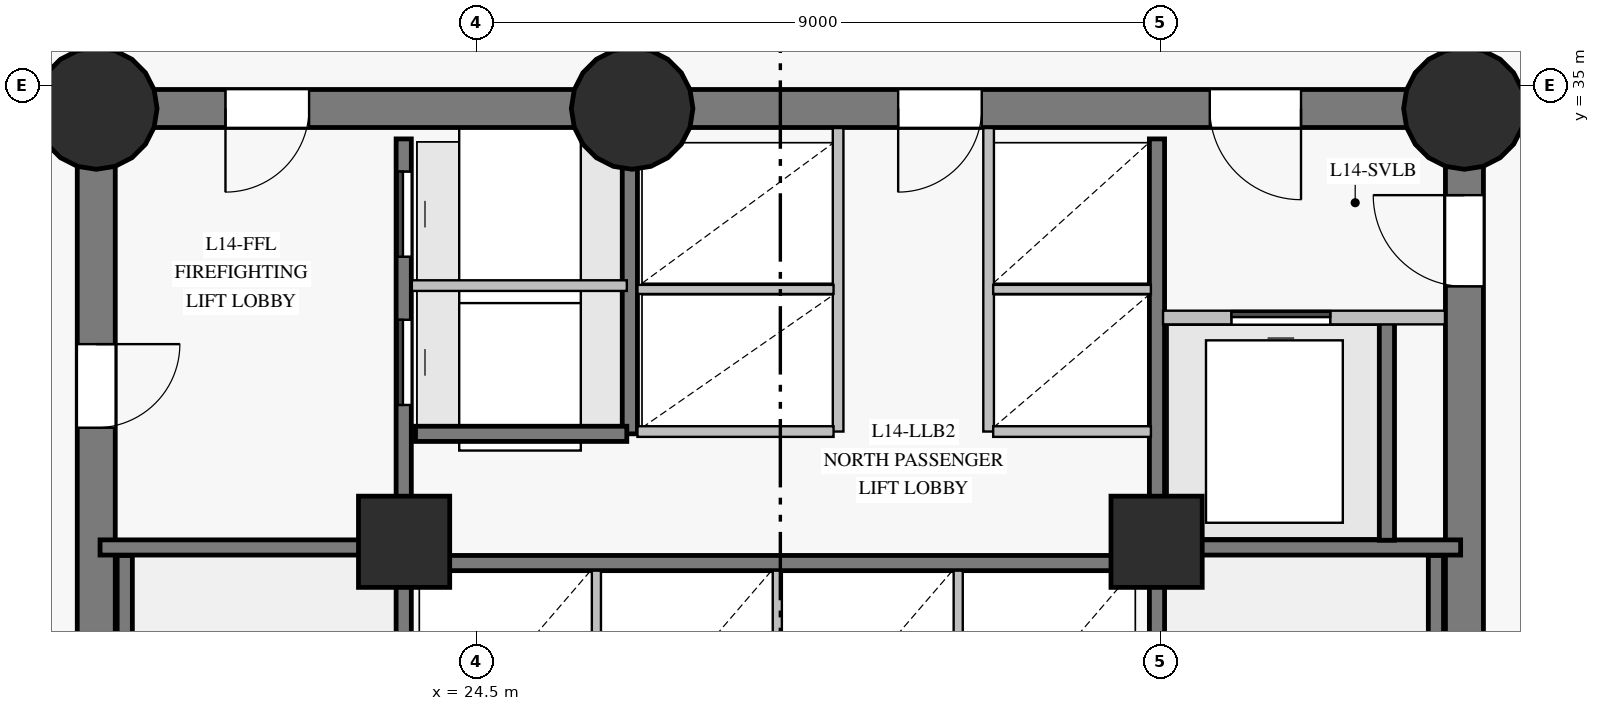
"""IFC4 building model, lengths in metres.
Left out: names, types, materials, properties, quantities, classifications, styles, units other than length and angle.
Written with IfcOpenShell. Run it as: python <this file> out.ifc"""

import sys

from ifc_helpers import new_model, si_unit, direction, frame, frame_2d, origin, origin_with_axes, origin_2d, place, context, subcontext, project, spatial, rectangle, circle, extrude, source, transform, mapped, element, fill, save


model = new_model("IFC4")
c1 = context("Model", 3, precision=1e-05, world=origin(), true_north=direction((0.0, 1.0)))
c2 = subcontext(c1, "Body", "Model", "MODEL_VIEW")
j1 = project(units=[si_unit("LENGTHUNIT", "METRE"), si_unit("PLANEANGLEUNIT", "RADIAN")], contexts=[c1])
p1 = place(None, origin())
s1 = spatial("IfcSite", under=j1, at=p1, CompositionType="ELEMENT")
p2 = place(p1, origin())
s2 = spatial("IfcBuilding", under=s1, at=p2, CompositionType="ELEMENT")
p3 = place(p2, frame((0.0, 0.0, 55.3)))
s3 = spatial("IfcBuildingStorey", under=s2, at=p3, CompositionType="ELEMENT", Elevation=55.3)
p4 = place(p3, frame((37.5, 18.3, 0.0), z_axis=(0.0, 0.0, 1.0), x_axis=(0.0, 1.0, 0.0)))
e1 = element("IfcWall", 1, at=p4, inside=s3, PredefinedType="SHEAR", context=c2, shape_type="SweptSolid", body=[
    extrude(rectangle(XDim=16.4, YDim=0.5, at=frame_2d((8.2, 0.0))), origin(), (0.0, 0.0, 1.0), 3.35),
])
p5 = place(p4, frame((14.06, 0.0, 0.0)))
e2 = element("IfcOpeningElement", 2, at=p5, cuts=e1, PredefinedType="OPENING", context=c2, shape_type="SweptSolid", body=[
    extrude(rectangle(XDim=1.2, YDim=2.15, at=frame_2d((0.6, 1.075))), frame((0.0, 0.26, 0.0), z_axis=(0.0, -1.0, 0.0), x_axis=(1.0, 0.0, 0.0)), (0.0, 0.0, 1.0), 0.52),
])
p6 = place(p3, frame((37.5, 34.7, 0.0), z_axis=(0.0, 0.0, 1.0), x_axis=(-1.0, 0.0, 0.0)))
e3 = element("IfcWall", 3, at=p6, inside=s3, PredefinedType="SHEAR", context=c2, shape_type="SweptSolid", body=[
    extrude(rectangle(XDim=10.95, YDim=0.5, at=frame_2d((5.475, 0.0))), origin(), (0.0, 0.0, 1.0), 3.35),
])
p7 = place(p6, frame((2.15, 0.0, 0.0)))
e4 = element("IfcOpeningElement", 4, at=p7, cuts=e3, PredefinedType="OPENING", context=c2, shape_type="SweptSolid", body=[
    extrude(rectangle(XDim=1.2, YDim=2.15, at=frame_2d((0.6, 1.075))), frame((0.0, 0.26, 0.0), z_axis=(0.0, -1.0, 0.0), x_axis=(1.0, 0.0, 0.0)), (0.0, 0.0, 1.0), 0.52),
])
p8 = place(p6, frame((6.35, 0.0, 0.0)))
e5 = element("IfcOpeningElement", 5, at=p8, cuts=e3, PredefinedType="OPENING", context=c2, shape_type="SweptSolid", body=[
    extrude(rectangle(XDim=1.1, YDim=2.15, at=frame_2d((0.55, 1.075))), frame((0.0, 0.26, 0.0), z_axis=(0.0, -1.0, 0.0), x_axis=(1.0, 0.0, 0.0)), (0.0, 0.0, 1.0), 0.52),
])
p9 = place(p3, frame((26.55, 34.7, 0.0), z_axis=(0.0, 0.0, 1.0), x_axis=(-1.0, 0.0, 0.0)))
e6 = element("IfcWall", 6, at=p9, inside=s3, PredefinedType="SHEAR", context=c2, shape_type="SweptSolid", body=[
    extrude(rectangle(XDim=7.05, YDim=0.5, at=frame_2d((3.525, 0.0))), origin(), (0.0, 0.0, 1.0), 3.35),
])
p10 = place(p9, frame((4.25, 0.0, 0.0)))
e7 = element("IfcOpeningElement", 7, at=p10, cuts=e6, PredefinedType="OPENING", context=c2, shape_type="SweptSolid", body=[
    extrude(rectangle(XDim=1.1, YDim=2.15, at=frame_2d((0.55, 1.075))), frame((0.0, 0.26, 0.0), z_axis=(0.0, -1.0, 0.0), x_axis=(1.0, 0.0, 0.0)), (0.0, 0.0, 1.0), 0.52),
])
p11 = place(p3, frame((19.5, 34.7, 0.0), z_axis=(0.0, 0.0, 1.0), x_axis=(0.0, -1.0, 0.0)))
e8 = element("IfcWall", 8, at=p11, inside=s3, PredefinedType="SHEAR", context=c2, shape_type="SweptSolid", body=[
    extrude(rectangle(XDim=16.4, YDim=0.5, at=frame_2d((8.2, 0.0))), origin(), (0.0, 0.0, 1.0), 3.35),
])
p12 = place(p11, frame((3.1, 0.0, 0.0)))
e9 = element("IfcOpeningElement", 9, at=p12, cuts=e8, PredefinedType="OPENING", context=c2, shape_type="SweptSolid", body=[
    extrude(rectangle(XDim=1.1, YDim=2.15, at=frame_2d((0.55, 1.075))), frame((0.0, 0.26, 0.0), z_axis=(0.0, -1.0, 0.0), x_axis=(1.0, 0.0, 0.0)), (0.0, 0.0, 1.0), 0.52),
])
m1 = source(origin_with_axes(), c2, "Body", "SweptSolid", [
    extrude(circle(Radius=0.8, at=origin_2d()), origin(), (0.0, 0.0, 1.0), 3.6),
])
for number, where, z_axis, x_axis in (
    (10, (19.5, 34.7, 0.0), (0.0, 0.0, 1.0), (1.0, 0.0, 0.0)),
    (11, (26.55, 34.7, 0.0), (0.0, 0.0, 1.0), (1.0, 0.0, 0.0)),
    (12, (37.5, 34.7, 0.0), (0.0, 0.0, 1.0), (1.0, 0.0, 0.0)),
):
    element("IfcColumn", number, at=place(p3, frame(where, z_axis=z_axis, x_axis=x_axis)), inside=s3, PredefinedType="COLUMN", context=c2, shape_type="MappedRepresentation", body=[
        mapped(m1, transform((0.0, 0.0, 0.0), scale=1.0)),
    ])
m2 = source(origin_with_axes(), c2, "Body", "SweptSolid", [
    extrude(rectangle(XDim=1.2, YDim=1.2, at=origin_2d()), origin(), (0.0, 0.0, 1.0), 3.6),
])
for number, where, z_axis, x_axis in (
    (13, (23.55, 29.0, 0.0), (0.0, 0.0, 1.0), (1.0, 0.0, 0.0)),
    (14, (33.45, 29.0, 0.0), (0.0, 0.0, 1.0), (1.0, 0.0, 0.0)),
):
    element("IfcColumn", number, at=place(p3, frame(where, z_axis=z_axis, x_axis=x_axis)), inside=s3, PredefinedType="COLUMN", context=c2, shape_type="MappedRepresentation", body=[
        mapped(m2, transform((0.0, 0.0, 0.0), scale=1.0)),
    ])
p13 = place(p3, frame((23.545, 18.7, 0.0), z_axis=(0.0, 0.0, 1.0), x_axis=(0.0, 1.0, 0.0)))
e15 = element("IfcWall", 15, at=p13, inside=s3, PredefinedType="SHEAR", context=c2, shape_type="SweptSolid", body=[
    extrude(rectangle(XDim=15.6, YDim=0.2, at=frame_2d((7.8, 0.0))), origin(), (0.0, 0.0, 1.0), 3.35),
])
p14 = place(p13, frame((2.75, 0.0, 0.0)))
e16 = element("IfcOpeningElement", 16, at=p14, cuts=e15, PredefinedType="OPENING", context=c2, shape_type="SweptSolid", body=[
    extrude(rectangle(XDim=1.15, YDim=2.15, at=frame_2d((0.575, 1.075))), frame((0.0, 0.11, 0.0), z_axis=(0.0, -1.0, 0.0), x_axis=(1.0, 0.0, 0.0)), (0.0, 0.0, 1.0), 0.22),
])
p15 = place(p13, frame((0.14, 0.0, 0.0)))
e17 = element("IfcOpeningElement", 17, at=p15, cuts=e15, PredefinedType="OPENING", context=c2, shape_type="SweptSolid", body=[
    extrude(rectangle(XDim=0.88, YDim=2.1, at=frame_2d((0.44, 1.05))), frame((0.0, 0.11, 0.0), z_axis=(0.0, -1.0, 0.0), x_axis=(1.0, 0.0, 0.0)), (0.0, 0.0, 1.0), 0.22),
])
p16 = place(p13, frame((1.36, 0.0, 0.0)))
e18 = element("IfcOpeningElement", 18, at=p16, cuts=e15, PredefinedType="OPENING", context=c2, shape_type="SweptSolid", body=[
    extrude(rectangle(XDim=0.88, YDim=2.1, at=frame_2d((0.44, 1.05))), frame((0.0, 0.11, 0.0), z_axis=(0.0, -1.0, 0.0), x_axis=(1.0, 0.0, 0.0)), (0.0, 0.0, 1.0), 0.22),
])
p17 = place(p13, frame((12.1, 0.0, 0.0)))
e19 = element("IfcOpeningElement", 19, at=p17, cuts=e15, PredefinedType="OPENING", context=c2, shape_type="SweptSolid", body=[
    extrude(rectangle(XDim=1.12, YDim=2.15, at=frame_2d((0.56, 1.075))), frame((0.0, 0.11, 0.0), z_axis=(0.0, -1.0, 0.0), x_axis=(1.0, 0.0, 0.0)), (0.0, 0.0, 1.0), 0.22),
])
p18 = place(p13, frame((14.05, 0.0, 0.0)))
e20 = element("IfcOpeningElement", 20, at=p18, cuts=e15, PredefinedType="OPENING", context=c2, shape_type="SweptSolid", body=[
    extrude(rectangle(XDim=1.12, YDim=2.15, at=frame_2d((0.56, 1.075))), frame((0.0, 0.11, 0.0), z_axis=(0.0, -1.0, 0.0), x_axis=(1.0, 0.0, 0.0)), (0.0, 0.0, 1.0), 0.22),
])
p19 = place(p3, frame((33.455, 18.7, 0.0), z_axis=(0.0, 0.0, 1.0), x_axis=(0.0, 1.0, 0.0)))
e21 = element("IfcWall", 21, at=p19, inside=s3, PredefinedType="SHEAR", context=c2, shape_type="SweptSolid", body=[
    extrude(rectangle(XDim=15.6, YDim=0.2, at=frame_2d((7.8, 0.0))), origin(), (0.0, 0.0, 1.0), 3.35),
])
p20 = place(p19, frame((2.75, 0.0, 0.0)))
e22 = element("IfcOpeningElement", 22, at=p20, cuts=e21, PredefinedType="OPENING", context=c2, shape_type="SweptSolid", body=[
    extrude(rectangle(XDim=1.15, YDim=2.15, at=frame_2d((0.575, 1.075))), frame((0.0, 0.11, 0.0), z_axis=(0.0, -1.0, 0.0), x_axis=(1.0, 0.0, 0.0)), (0.0, 0.0, 1.0), 0.22),
])
p21 = place(p19, frame((0.55, 0.0, 0.0)))
e23 = element("IfcOpeningElement", 23, at=p21, cuts=e21, PredefinedType="OPENING", context=c2, shape_type="SweptSolid", body=[
    extrude(rectangle(XDim=0.94, YDim=2.1, at=frame_2d((0.47, 1.05))), frame((0.0, 0.11, 0.0), z_axis=(0.0, -1.0, 0.0), x_axis=(1.0, 0.0, 0.0)), (0.0, 0.0, 1.0), 0.22),
])
p22 = place(p3, frame((23.7, 28.72, 0.0), z_axis=(0.0, 0.0, 1.0), x_axis=(1.0, 0.0, 0.0)))
e24 = element("IfcWall", 24, at=p22, inside=s3, PredefinedType="SHEAR", context=c2, shape_type="SweptSolid", body=[
    extrude(rectangle(XDim=9.6, YDim=0.2, at=frame_2d((4.8, 0.0))), origin(), (0.0, 0.0, 1.0), 3.35),
])
for number, where, z_axis, x_axis in (
    (25, (19.875, 21.32, 0.0), (0.0, 0.0, 1.0), (0.0, 1.0, 0.0)),
    (26, (37.125, 21.32, 0.0), (0.0, 0.0, 1.0), (0.0, 1.0, 0.0)),
):
    element("IfcWall", number, at=place(p3, frame(where, z_axis=z_axis, x_axis=x_axis)), inside=s3, PredefinedType="SHEAR", context=c2, shape_type="SweptSolid", body=[
        extrude(rectangle(XDim=7.5, YDim=0.2, at=frame_2d((3.75, 0.0))), origin(), (0.0, 0.0, 1.0), 3.35),
    ])
for number, where, z_axis, x_axis in (
    (27, (33.455, 28.925, 0.0), (0.0, 0.0, 1.0), (1.0, 0.0, 0.0)),
    (28, (19.55, 28.925, 0.0), (0.0, 0.0, 1.0), (1.0, 0.0, 0.0)),
):
    element("IfcWall", number, at=place(p3, frame(where, z_axis=z_axis, x_axis=x_axis)), inside=s3, PredefinedType="SHEAR", context=c2, shape_type="SweptSolid", body=[
        extrude(rectangle(XDim=3.995, YDim=0.2, at=frame_2d((1.998, 0.0))), origin(), (0.0, 0.0, 1.0), 3.35),
    ])
p23 = place(p3, frame((26.52, 30.42, 0.0), z_axis=(0.0, 0.0, 1.0), x_axis=(0.0, 1.0, 0.0)))
e29 = element("IfcWall", 29, at=p23, inside=s3, PredefinedType="SHEAR", context=c2, shape_type="SweptSolid", body=[
    extrude(rectangle(XDim=3.86, YDim=0.2, at=frame_2d((1.93, 0.0))), origin(), (0.0, 0.0, 1.0), 3.35),
])
p24 = place(p3, frame((36.48, 29.02, 0.0), z_axis=(0.0, 0.0, 1.0), x_axis=(0.0, 1.0, 0.0)))
e30 = element("IfcWall", 30, at=p24, inside=s3, PredefinedType="SHEAR", context=c2, shape_type="SweptSolid", body=[
    extrude(rectangle(XDim=2.86, YDim=0.2, at=frame_2d((1.43, 0.0))), origin(), (0.0, 0.0, 1.0), 3.35),
])
p25 = place(p3, frame((23.7, 30.42, 0.0), z_axis=(0.0, 0.0, 1.0), x_axis=(1.0, 0.0, 0.0)))
e31 = element("IfcWall", 31, at=p25, inside=s3, PredefinedType="SHEAR", context=c2, shape_type="SweptSolid", body=[
    extrude(rectangle(XDim=2.78, YDim=0.2, at=frame_2d((1.39, 0.0))), origin(), (0.0, 0.0, 1.0), 3.35),
])
for number, where, z_axis, x_axis in (
    (32, (29.26, 30.45, 0.0), (0.0, 0.0, 1.0), (0.0, 1.0, 0.0)),
    (33, (31.24, 30.45, 0.0), (0.0, 0.0, 1.0), (0.0, 1.0, 0.0)),
):
    element("IfcWall", number, at=place(p3, frame(where, z_axis=z_axis, x_axis=x_axis)), inside=s3, PredefinedType="PARTITIONING", context=c2, shape_type="SweptSolid", body=[
        extrude(rectangle(XDim=3.993, YDim=0.14, at=frame_2d((1.997, 0.0))), origin(), (0.0, 0.0, 1.0), 3.35),
    ])
p26 = place(p3, frame((33.535, 31.95, 0.0), z_axis=(0.0, 0.0, 1.0), x_axis=(1.0, 0.0, 0.0)))
e34 = element("IfcWall", 34, at=p26, inside=s3, PredefinedType="PARTITIONING", context=c2, shape_type="SweptSolid", body=[
    extrude(rectangle(XDim=3.709, YDim=0.18, at=frame_2d((1.854, 0.0))), origin(), (0.0, 0.0, 1.0), 3.35),
])
p27 = place(p26, frame((0.9, 0.0, 0.0)))
e35 = element("IfcOpeningElement", 35, at=p27, cuts=e34, PredefinedType="OPENING", context=c2, shape_type="SweptSolid", body=[
    extrude(rectangle(XDim=1.3, YDim=2.2, at=frame_2d((0.65, 1.1))), frame((0.0, 0.1, 0.0), z_axis=(0.0, -1.0, 0.0), x_axis=(1.0, 0.0, 0.0)), (0.0, 0.0, 1.0), 0.2),
])
p28 = place(p3, frame((23.652, 32.37, 0.0), z_axis=(0.0, 0.0, 1.0), x_axis=(1.0, 0.0, 0.0)))
e36 = element("IfcWall", 36, at=p28, inside=s3, PredefinedType="PARTITIONING", context=c2, shape_type="SweptSolid", body=[
    extrude(rectangle(XDim=2.828, YDim=0.14, at=frame_2d((1.414, 0.0))), origin(), (0.0, 0.0, 1.0), 3.35),
])
for number, where, z_axis, x_axis in (
    (37, (26.08, 26.02, 0.0), (0.0, 0.0, 1.0), (0.0, 1.0, 0.0)),
    (38, (28.46, 26.02, 0.0), (0.0, 0.0, 1.0), (0.0, 1.0, 0.0)),
    (39, (30.84, 26.02, 0.0), (0.0, 0.0, 1.0), (0.0, 1.0, 0.0)),
):
    element("IfcWall", number, at=place(p3, frame(where, z_axis=z_axis, x_axis=x_axis)), inside=s3, PredefinedType="PARTITIONING", context=c2, shape_type="SweptSolid", body=[
        extrude(rectangle(XDim=2.6, YDim=0.12, at=frame_2d((1.3, 0.0))), origin(), (0.0, 0.0, 1.0), 3.35),
    ])
p29 = place(p3, frame((26.62, 30.45, 0.0), z_axis=(0.0, 0.0, 1.0), x_axis=(1.0, 0.0, 0.0)))
e40 = element("IfcWall", 40, at=p29, inside=s3, PredefinedType="PARTITIONING", context=c2, shape_type="SweptSolid", body=[
    extrude(rectangle(XDim=2.58, YDim=0.14, at=frame_2d((1.29, 0.0))), origin(), (0.0, 0.0, 1.0), 3.35),
])
p30 = place(p3, frame((26.62, 32.32, 0.0), z_axis=(0.0, 0.0, 1.0), x_axis=(1.0, 0.0, 0.0)))
e41 = element("IfcWall", 41, at=p30, inside=s3, PredefinedType="PARTITIONING", context=c2, shape_type="SweptSolid", body=[
    extrude(rectangle(XDim=2.58, YDim=0.12, at=frame_2d((1.29, 0.0))), origin(), (0.0, 0.0, 1.0), 3.35),
])
p31 = place(p3, frame((31.3, 30.45, 0.0), z_axis=(0.0, 0.0, 1.0), x_axis=(1.0, 0.0, 0.0)))
e42 = element("IfcWall", 42, at=p31, inside=s3, PredefinedType="PARTITIONING", context=c2, shape_type="SweptSolid", body=[
    extrude(rectangle(XDim=2.075, YDim=0.14, at=frame_2d((1.038, 0.0))), origin(), (0.0, 0.0, 1.0), 3.35),
])
p32 = place(p3, frame((31.3, 32.32, 0.0), z_axis=(0.0, 0.0, 1.0), x_axis=(1.0, 0.0, 0.0)))
e43 = element("IfcWall", 43, at=p32, inside=s3, PredefinedType="PARTITIONING", context=c2, shape_type="SweptSolid", body=[
    extrude(rectangle(XDim=2.075, YDim=0.12, at=frame_2d((1.038, 0.0))), origin(), (0.0, 0.0, 1.0), 3.35),
])
m3 = source(origin_with_axes(), c2, "Body", "SweptSolid", [
    extrude(rectangle(XDim=1.1, YDim=2.15, at=frame_2d((0.55, 1.075))), frame((0.0, 0.025, 0.0), z_axis=(0.0, -1.0, 0.0), x_axis=(1.0, 0.0, 0.0)), (0.0, 0.0, 1.0), 0.05),
])
p33 = place(p10, origin())
e44 = element("IfcDoor", 44, at=p33, inside=s3, OperationType="SINGLE_SWING_RIGHT", PredefinedType="DOOR", context=c2, shape_type="MappedRepresentation", body=[
    mapped(m3, transform((0.0, 0.0, 0.0), scale=1.0)),
])
fill(e7, e44)
p34 = place(p12, origin())
e45 = element("IfcDoor", 45, at=p34, inside=s3, OperationType="SINGLE_SWING_LEFT", PredefinedType="DOOR", context=c2, shape_type="MappedRepresentation", body=[
    mapped(m3, transform((0.0, 0.0, 0.0), scale=1.0)),
])
fill(e9, e45)
m4 = source(origin_with_axes(), c2, "Body", "SweptSolid", [
    extrude(rectangle(XDim=1.2, YDim=2.15, at=frame_2d((0.6, 1.075))), frame((0.0, 0.025, 0.0), z_axis=(0.0, -1.0, 0.0), x_axis=(1.0, 0.0, 0.0)), (0.0, 0.0, 1.0), 0.05),
])
p35 = place(p5, origin())
e46 = element("IfcDoor", 46, at=p35, inside=s3, OperationType="SINGLE_SWING_RIGHT", PredefinedType="DOOR", context=c2, shape_type="MappedRepresentation", body=[
    mapped(m4, transform((0.0, 0.0, 0.0), scale=1.0)),
])
fill(e2, e46)
p36 = place(p7, origin())
e47 = element("IfcDoor", 47, at=p36, inside=s3, OperationType="SINGLE_SWING_LEFT", PredefinedType="DOOR", context=c2, shape_type="MappedRepresentation", body=[
    mapped(m4, transform((0.0, 0.0, 0.0), scale=1.0)),
])
fill(e4, e47)
m5 = source(origin_with_axes(), c2, "Body", "SweptSolid", [
    extrude(rectangle(XDim=1.3, YDim=2.2, at=frame_2d((0.65, 1.1))), frame((0.0, 0.025, 0.0), z_axis=(0.0, -1.0, 0.0), x_axis=(1.0, 0.0, 0.0)), (0.0, 0.0, 1.0), 0.05),
])
p37 = place(p27, origin())
e48 = element("IfcDoor", 48, at=p37, inside=s3, OperationType="SLIDING_TO_LEFT", PredefinedType="DOOR", context=c2, shape_type="MappedRepresentation", body=[
    mapped(m5, transform((0.0, 0.0, 0.0), scale=1.0)),
])
fill(e35, e48)
p38 = place(p8, origin())
e49 = element("IfcDoor", 49, at=p38, inside=s3, OperationType="SINGLE_SWING_RIGHT", PredefinedType="DOOR", context=c2, shape_type="MappedRepresentation", body=[
    mapped(m3, transform((0.0, 0.0, 0.0), scale=1.0)),
])
fill(e5, e49)
m6 = source(origin_with_axes(), c2, "Body", "SweptSolid", [
    extrude(rectangle(XDim=1.12, YDim=2.15, at=frame_2d((0.56, 1.075))), frame((0.0, 0.025, 0.0), z_axis=(0.0, -1.0, 0.0), x_axis=(1.0, 0.0, 0.0)), (0.0, 0.0, 1.0), 0.05),
])
p39 = place(p17, origin())
e50 = element("IfcDoor", 50, at=p39, inside=s3, OperationType="SLIDING_TO_LEFT", PredefinedType="DOOR", context=c2, shape_type="MappedRepresentation", body=[
    mapped(m6, transform((0.0, 0.0, 0.0), scale=1.0)),
])
fill(e19, e50)
p40 = place(p18, origin())
e51 = element("IfcDoor", 51, at=p40, inside=s3, OperationType="SLIDING_TO_RIGHT", PredefinedType="DOOR", context=c2, shape_type="MappedRepresentation", body=[
    mapped(m6, transform((0.0, 0.0, 0.0), scale=1.0)),
])
fill(e20, e51)
save(model, sys.argv[1])
